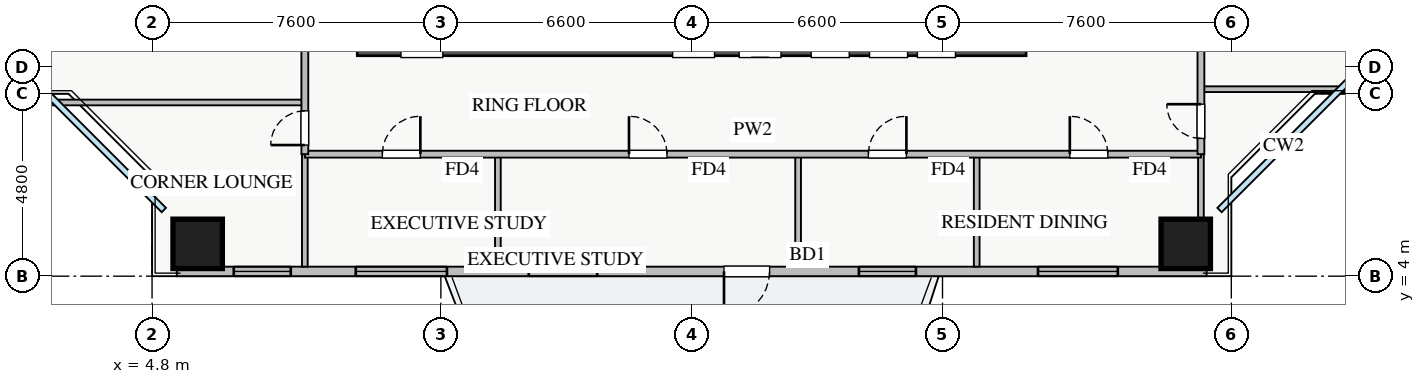
"""IFC4 building model, lengths in metres.
Left out: names, types, materials, properties, quantities, classifications, styles, units other than length and angle.
Written with IfcOpenShell. Run it as: python <this file> out.ifc"""

import sys

from ifc_helpers import new_model, si_unit, direction, frame, frame_2d, origin, origin_2d, place, context, subcontext, project, spatial, rectangle, extrude, source, transform, mapped, element, fill, save


model = new_model("IFC4")
c1 = context("Model", 3, precision=1e-05, world=origin(), true_north=direction((0.0, 1.0)))
c2 = subcontext(c1, "Body", "Model", "MODEL_VIEW")
j1 = project(units=[si_unit("LENGTHUNIT", "METRE"), si_unit("PLANEANGLEUNIT", "RADIAN")], contexts=[c1])
p1 = place(None, origin())
s1 = spatial("IfcSite", under=j1, at=p1, CompositionType="ELEMENT")
p2 = place(p1, origin())
s2 = spatial("IfcBuilding", under=s1, at=p2, CompositionType="ELEMENT")
p3 = place(p2, frame((0.0, 0.0, 56.75)))
s3 = spatial("IfcBuildingStorey", under=s2, at=p3, CompositionType="ELEMENT", Elevation=56.75)
p4 = place(p3, frame((10.2, 10.2, 0.0), z_axis=(0.0, 0.0, 1.0), x_axis=(1.0, 0.0, 0.0)))
e1 = element("IfcWall", 1, at=p4, inside=s3, PredefinedType="SHEAR", context=c2, shape_type="SweptSolid", body=[
    extrude(rectangle(XDim=17.6, YDim=0.8, at=frame_2d((8.8, 0.0))), origin(), (0.0, 0.0, 1.0), 3.25),
])
p5 = place(p4, frame((1.15, 0.0, 0.0)))
e2 = element("IfcOpeningElement", 2, at=p5, cuts=e1, PredefinedType="OPENING", context=c2, shape_type="SweptSolid", body=[
    extrude(rectangle(XDim=1.1, YDim=2.05, at=frame_2d((0.55, 1.025))), frame((0.0, 0.41, 0.0), z_axis=(0.0, -1.0, 0.0), x_axis=(1.0, 0.0, 0.0)), (0.0, 0.0, 1.0), 0.82),
])
p6 = place(p4, frame((8.3, 0.0, 0.0)))
e3 = element("IfcOpeningElement", 3, at=p6, cuts=e1, PredefinedType="OPENING", context=c2, shape_type="SweptSolid", body=[
    extrude(rectangle(XDim=1.1, YDim=2.05, at=frame_2d((0.55, 1.025))), frame((0.0, 0.41, 0.0), z_axis=(0.0, -1.0, 0.0), x_axis=(1.0, 0.0, 0.0)), (0.0, 0.0, 1.0), 0.82),
])
p7 = place(p4, frame((10.05, 0.0, 0.0)))
e4 = element("IfcOpeningElement", 4, at=p7, cuts=e1, PredefinedType="OPENING", context=c2, shape_type="SweptSolid", body=[
    extrude(rectangle(XDim=1.1, YDim=2.05, at=frame_2d((0.55, 1.025))), frame((0.0, 0.41, 0.0), z_axis=(0.0, -1.0, 0.0), x_axis=(1.0, 0.0, 0.0)), (0.0, 0.0, 1.0), 0.82),
])
p8 = place(p4, frame((14.74, 0.0, 0.0)))
e5 = element("IfcOpeningElement", 5, at=p8, cuts=e1, PredefinedType="OPENING", context=c2, shape_type="SweptSolid", body=[
    extrude(rectangle(XDim=1.0, YDim=2.05, at=frame_2d((0.5, 1.025))), frame((0.0, 0.41, 0.0), z_axis=(0.0, -1.0, 0.0), x_axis=(1.0, 0.0, 0.0)), (0.0, 0.0, 1.0), 0.82),
])
p9 = place(p4, frame((11.945, 0.0, 0.0)))
e6 = element("IfcOpeningElement", 6, at=p9, cuts=e1, PredefinedType="OPENING", context=c2, shape_type="SweptSolid", body=[
    extrude(rectangle(XDim=1.0, YDim=2.05, at=frame_2d((0.5, 1.025))), frame((0.0, 0.41, 0.0), z_axis=(0.0, -1.0, 0.0), x_axis=(1.0, 0.0, 0.0)), (0.0, 0.0, 1.0), 0.82),
])
p10 = place(p4, frame((13.48, 0.0, 0.0)))
e7 = element("IfcOpeningElement", 7, at=p10, cuts=e1, PredefinedType="OPENING", context=c2, shape_type="SweptSolid", body=[
    extrude(rectangle(XDim=1.0, YDim=2.05, at=frame_2d((0.5, 1.025))), frame((0.0, 0.41, 0.0), z_axis=(0.0, -1.0, 0.0), x_axis=(1.0, 0.0, 0.0)), (0.0, 0.0, 1.0), 0.82),
])
m1 = source(origin(), c2, "Body", "SweptSolid", [
    extrude(rectangle(XDim=1.3, YDim=1.3, at=origin_2d()), origin(), (0.0, 0.0, 1.0), 3.25),
])
for number, where, z_axis, x_axis in (
    (8, (6.0, 4.85, 0.0), (0.0, 0.0, 1.0), (1.0, 0.0, 0.0)),
    (9, (32.0, 4.85, 0.0), (0.0, 0.0, 1.0), (1.0, 0.0, 0.0)),
):
    element("IfcColumn", number, at=place(p3, frame(where, z_axis=z_axis, x_axis=x_axis)), inside=s3, PredefinedType="COLUMN", context=c2, shape_type="MappedRepresentation", body=[
        mapped(m1, transform((0.0, 0.0, 0.0), x_axis=(1.0, 0.0, 0.0), y_axis=(0.0, 1.0, 0.0), z_axis=(0.0, 0.0, 1.0), scale=1.0)),
    ])
p11 = place(p3, frame((5.45, 4.125, 0.0), z_axis=(0.0, 0.0, 1.0), x_axis=(1.0, 0.0, 0.0)))
e10 = element("IfcWall", 10, at=p11, inside=s3, PredefinedType="STANDARD", context=c2, shape_type="SweptSolid", body=[
    extrude(rectangle(XDim=27.1, YDim=0.25, at=frame_2d((13.55, 0.0))), origin(), (0.0, 0.0, 1.0), 2.61),
])
p12 = place(p11, frame((14.4, 0.0, 0.0)))
e11 = element("IfcOpeningElement", 11, at=p12, cuts=e10, PredefinedType="OPENING", context=c2, shape_type="SweptSolid", body=[
    extrude(rectangle(XDim=1.2, YDim=2.1, at=frame_2d((0.6, 1.05))), frame((0.0, 0.135, 0.0), z_axis=(0.0, -1.0, 0.0), x_axis=(1.0, 0.0, 0.0)), (0.0, 0.0, 1.0), 0.27),
])
p13 = place(p11, frame((1.5, 0.0, 0.9)))
e12 = element("IfcOpeningElement", 12, at=p13, cuts=e10, PredefinedType="OPENING", context=c2, shape_type="SweptSolid", body=[
    extrude(rectangle(XDim=1.5, YDim=1.5, at=frame_2d((0.75, 0.75))), frame((0.0, 0.135, 0.0), z_axis=(0.0, -1.0, 0.0), x_axis=(1.0, 0.0, 0.0)), (0.0, 0.0, 1.0), 0.27),
])
p14 = place(p11, frame((9.263, 0.0, 0.9)))
e13 = element("IfcOpeningElement", 13, at=p14, cuts=e10, PredefinedType="OPENING", context=c2, shape_type="SweptSolid", body=[
    extrude(rectangle(XDim=1.8, YDim=1.45, at=frame_2d((0.9, 0.725))), frame((0.0, 0.135, 0.0), z_axis=(0.0, -1.0, 0.0), x_axis=(1.0, 0.0, 0.0)), (0.0, 0.0, 1.0), 0.27),
])
p15 = place(p11, frame((17.95, 0.0, 0.9)))
e14 = element("IfcOpeningElement", 14, at=p15, cuts=e10, PredefinedType="OPENING", context=c2, shape_type="SweptSolid", body=[
    extrude(rectangle(XDim=1.5, YDim=1.5, at=frame_2d((0.75, 0.75))), frame((0.0, 0.135, 0.0), z_axis=(0.0, -1.0, 0.0), x_axis=(1.0, 0.0, 0.0)), (0.0, 0.0, 1.0), 0.27),
])
p16 = place(p11, frame((22.663, 0.0, 0.9)))
e15 = element("IfcOpeningElement", 15, at=p16, cuts=e10, PredefinedType="OPENING", context=c2, shape_type="SweptSolid", body=[
    extrude(rectangle(XDim=2.1, YDim=1.48, at=frame_2d((1.05, 0.74))), frame((0.0, 0.135, 0.0), z_axis=(0.0, -1.0, 0.0), x_axis=(1.0, 0.0, 0.0)), (0.0, 0.0, 1.0), 0.27),
])
p17 = place(p11, frame((4.71, 0.0, 0.9)))
e16 = element("IfcOpeningElement", 16, at=p17, cuts=e10, PredefinedType="OPENING", context=c2, shape_type="SweptSolid", body=[
    extrude(rectangle(XDim=2.4, YDim=1.5, at=frame_2d((1.2, 0.75))), frame((0.0, 0.135, 0.0), z_axis=(0.0, -1.0, 0.0), x_axis=(1.0, 0.0, 0.0)), (0.0, 0.0, 1.0), 0.27),
])
for number, where, z_axis, x_axis in (
    (17, (13.9, 4.25, 0.0), (0.0, 0.0, 1.0), (0.0, 1.0, 0.0)),
    (18, (21.8, 4.25, 0.0), (0.0, 0.0, 1.0), (0.0, 1.0, 0.0)),
    (19, (26.5, 4.25, 0.0), (0.0, 0.0, 1.0), (0.0, 1.0, 0.0)),
    (20, (8.82, 4.25, 0.0), (0.0, 0.0, 1.0), (0.0, 1.0, 0.0)),
    (21, (32.4, 4.25, 0.0), (0.0, 0.0, 1.0), (0.0, 1.0, 0.0)),
):
    element("IfcWall", number, at=place(p3, frame(where, z_axis=z_axis, x_axis=x_axis)), inside=s3, PredefinedType="PARTITIONING", context=c2, shape_type="SweptSolid", body=[
        extrude(rectangle(XDim=2.96, YDim=0.15, at=frame_2d((1.48, 0.0))), origin(), (0.0, 0.0, 1.0), 3.07),
    ])
p18 = place(p3, frame((8.82, 7.21, 0.0), z_axis=(0.0, 0.0, 1.0), x_axis=(1.0, 0.0, 0.0)))
e22 = element("IfcWall", 22, at=p18, inside=s3, PredefinedType="PARTITIONING", context=c2, shape_type="SweptSolid", body=[
    extrude(rectangle(XDim=23.58, YDim=0.18, at=frame_2d((11.79, 0.0))), origin(), (0.0, 0.0, 1.0), 3.07),
])
p19 = place(p18, frame((2.04, 0.0, 0.0)))
e23 = element("IfcOpeningElement", 23, at=p19, cuts=e22, PredefinedType="OPENING", context=c2, shape_type="SweptSolid", body=[
    extrude(rectangle(XDim=1.0, YDim=2.05, at=frame_2d((0.5, 1.025))), frame((0.0, 0.1, 0.0), z_axis=(0.0, -1.0, 0.0), x_axis=(1.0, 0.0, 0.0)), (0.0, 0.0, 1.0), 0.2),
])
p20 = place(p18, frame((8.53, 0.0, 0.0)))
e24 = element("IfcOpeningElement", 24, at=p20, cuts=e22, PredefinedType="OPENING", context=c2, shape_type="SweptSolid", body=[
    extrude(rectangle(XDim=1.0, YDim=2.05, at=frame_2d((0.5, 1.025))), frame((0.0, 0.1, 0.0), z_axis=(0.0, -1.0, 0.0), x_axis=(1.0, 0.0, 0.0)), (0.0, 0.0, 1.0), 0.2),
])
p21 = place(p18, frame((14.83, 0.0, 0.0)))
e25 = element("IfcOpeningElement", 25, at=p21, cuts=e22, PredefinedType="OPENING", context=c2, shape_type="SweptSolid", body=[
    extrude(rectangle(XDim=1.0, YDim=2.05, at=frame_2d((0.5, 1.025))), frame((0.0, 0.1, 0.0), z_axis=(0.0, -1.0, 0.0), x_axis=(1.0, 0.0, 0.0)), (0.0, 0.0, 1.0), 0.2),
])
p22 = place(p18, frame((20.13, 0.0, 0.0)))
e26 = element("IfcOpeningElement", 26, at=p22, cuts=e22, PredefinedType="OPENING", context=c2, shape_type="SweptSolid", body=[
    extrude(rectangle(XDim=1.0, YDim=2.05, at=frame_2d((0.5, 1.025))), frame((0.0, 0.1, 0.0), z_axis=(0.0, -1.0, 0.0), x_axis=(1.0, 0.0, 0.0)), (0.0, 0.0, 1.0), 0.2),
])
p23 = place(p3, frame((0.25, 8.57, 0.0), z_axis=(0.0, 0.0, 1.0), x_axis=(1.0, 0.0, 0.0)))
e27 = element("IfcWall", 27, at=p23, inside=s3, PredefinedType="PARTITIONING", context=c2, shape_type="SweptSolid", body=[
    extrude(rectangle(XDim=8.57, YDim=0.15, at=frame_2d((4.285, 0.0))), origin(), (0.0, 0.0, 1.0), 3.07),
])
p24 = place(p3, frame((8.82, 7.21, 0.0), z_axis=(0.0, 0.0, 1.0), x_axis=(0.0, 1.0, 0.0)))
e28 = element("IfcWall", 28, at=p24, inside=s3, PredefinedType="PARTITIONING", context=c2, shape_type="SweptSolid", body=[
    extrude(rectangle(XDim=31.23, YDim=0.18, at=frame_2d((15.615, 0.0))), origin(), (0.0, 0.0, 1.0), 3.07),
])
p25 = place(p24, frame((30.09, 0.0, 0.0)))
e29 = element("IfcOpeningElement", 29, at=p25, cuts=e28, PredefinedType="OPENING", context=c2, shape_type="SweptSolid", body=[
    extrude(rectangle(XDim=0.9, YDim=2.05, at=frame_2d((0.45, 1.025))), frame((0.0, 0.1, 0.0), z_axis=(0.0, -1.0, 0.0), x_axis=(1.0, 0.0, 0.0)), (0.0, 0.0, 1.0), 0.2),
])
p26 = place(p24, frame((0.24, 0.0, 0.0)))
e30 = element("IfcOpeningElement", 30, at=p26, cuts=e28, PredefinedType="OPENING", context=c2, shape_type="SweptSolid", body=[
    extrude(rectangle(XDim=0.9, YDim=2.05, at=frame_2d((0.45, 1.025))), frame((0.0, 0.1, 0.0), z_axis=(0.0, -1.0, 0.0), x_axis=(1.0, 0.0, 0.0)), (0.0, 0.0, 1.0), 0.2),
])
p27 = place(p24, frame((2.95, 0.0, 0.0)))
e31 = element("IfcOpeningElement", 31, at=p27, cuts=e28, PredefinedType="OPENING", context=c2, shape_type="SweptSolid", body=[
    extrude(rectangle(XDim=1.0, YDim=2.05, at=frame_2d((0.5, 1.025))), frame((0.0, 0.1, 0.0), z_axis=(0.0, -1.0, 0.0), x_axis=(1.0, 0.0, 0.0)), (0.0, 0.0, 1.0), 0.2),
])
p28 = place(p24, frame((15.115, 0.0, 0.0)))
e32 = element("IfcOpeningElement", 32, at=p28, cuts=e28, PredefinedType="OPENING", context=c2, shape_type="SweptSolid", body=[
    extrude(rectangle(XDim=1.0, YDim=2.05, at=frame_2d((0.5, 1.025))), frame((0.0, 0.1, 0.0), z_axis=(0.0, -1.0, 0.0), x_axis=(1.0, 0.0, 0.0)), (0.0, 0.0, 1.0), 0.2),
])
p29 = place(p24, frame((21.96, 0.0, 0.0)))
e33 = element("IfcOpeningElement", 33, at=p29, cuts=e28, PredefinedType="OPENING", context=c2, shape_type="SweptSolid", body=[
    extrude(rectangle(XDim=1.0, YDim=2.05, at=frame_2d((0.5, 1.025))), frame((0.0, 0.1, 0.0), z_axis=(0.0, -1.0, 0.0), x_axis=(1.0, 0.0, 0.0)), (0.0, 0.0, 1.0), 0.2),
])
p30 = place(p3, frame((32.4, 8.92, 0.0), z_axis=(0.0, 0.0, 1.0), x_axis=(1.0, 0.0, 0.0)))
e34 = element("IfcWall", 34, at=p30, inside=s3, PredefinedType="PARTITIONING", context=c2, shape_type="SweptSolid", body=[
    extrude(rectangle(XDim=5.35, YDim=0.15, at=frame_2d((2.675, 0.0))), origin(), (0.0, 0.0, 1.0), 3.07),
])
p31 = place(p3, frame((32.4, 7.21, 0.0), z_axis=(0.0, 0.0, 1.0), x_axis=(0.0, 1.0, 0.0)))
e35 = element("IfcWall", 35, at=p31, inside=s3, PredefinedType="PARTITIONING", context=c2, shape_type="SweptSolid", body=[
    extrude(rectangle(XDim=31.23, YDim=0.18, at=frame_2d((15.615, 0.0))), origin(), (0.0, 0.0, 1.0), 2.815),
])
p32 = place(p31, frame((30.09, 0.0, 0.0)))
e36 = element("IfcOpeningElement", 36, at=p32, cuts=e35, PredefinedType="OPENING", context=c2, shape_type="SweptSolid", body=[
    extrude(rectangle(XDim=0.9, YDim=2.05, at=frame_2d((0.45, 1.025))), frame((0.0, 0.1, 0.0), z_axis=(0.0, -1.0, 0.0), x_axis=(1.0, 0.0, 0.0)), (0.0, 0.0, 1.0), 0.2),
])
p33 = place(p31, frame((0.415, 0.0, 0.0)))
e37 = element("IfcOpeningElement", 37, at=p33, cuts=e35, PredefinedType="OPENING", context=c2, shape_type="SweptSolid", body=[
    extrude(rectangle(XDim=0.9, YDim=2.05, at=frame_2d((0.45, 1.025))), frame((0.0, 0.1, 0.0), z_axis=(0.0, -1.0, 0.0), x_axis=(1.0, 0.0, 0.0)), (0.0, 0.0, 1.0), 0.2),
])
p34 = place(p31, frame((3.585, 0.0, 0.0)))
e38 = element("IfcOpeningElement", 38, at=p34, cuts=e35, PredefinedType="OPENING", context=c2, shape_type="SweptSolid", body=[
    extrude(rectangle(XDim=1.0, YDim=2.05, at=frame_2d((0.5, 1.025))), frame((0.0, 0.1, 0.0), z_axis=(0.0, -1.0, 0.0), x_axis=(1.0, 0.0, 0.0)), (0.0, 0.0, 1.0), 0.2),
])
p35 = place(p31, frame((12.86, 0.0, 0.0)))
e39 = element("IfcOpeningElement", 39, at=p35, cuts=e35, PredefinedType="OPENING", context=c2, shape_type="SweptSolid", body=[
    extrude(rectangle(XDim=1.0, YDim=2.05, at=frame_2d((0.5, 1.025))), frame((0.0, 0.1, 0.0), z_axis=(0.0, -1.0, 0.0), x_axis=(1.0, 0.0, 0.0)), (0.0, 0.0, 1.0), 0.2),
])
p36 = place(p31, frame((22.5, 0.0, 0.0)))
e40 = element("IfcOpeningElement", 40, at=p36, cuts=e35, PredefinedType="OPENING", context=c2, shape_type="SweptSolid", body=[
    extrude(rectangle(XDim=1.0, YDim=2.05, at=frame_2d((0.5, 1.025))), frame((0.0, 0.1, 0.0), z_axis=(0.0, -1.0, 0.0), x_axis=(1.0, 0.0, 0.0)), (0.0, 0.0, 1.0), 0.2),
])
m2 = source(origin(), c2, "Body", "SweptSolid", [
    extrude(rectangle(XDim=1.2, YDim=2.1, at=frame_2d((0.6, 1.05))), frame((0.0, 0.025, 0.0), z_axis=(0.0, -1.0, 0.0), x_axis=(1.0, 0.0, 0.0)), (0.0, 0.0, 1.0), 0.05),
])
p37 = place(p12, frame((1.2, 0.0, 0.0), z_axis=(0.0, 0.0, 1.0), x_axis=(-1.0, 0.0, 0.0)))
e41 = element("IfcDoor", 41, at=p37, inside=s3, OperationType="SINGLE_SWING_LEFT", PredefinedType="DOOR", context=c2, shape_type="MappedRepresentation", body=[
    mapped(m2, transform((0.0, 0.0, 0.0), x_axis=(1.0, 0.0, 0.0), y_axis=(0.0, 1.0, 0.0), z_axis=(0.0, 0.0, 1.0), scale=1.0)),
])
fill(e11, e41)
m3 = source(origin(), c2, "Body", "SweptSolid", [
    extrude(rectangle(XDim=1.5, YDim=1.5, at=frame_2d((0.75, 0.75))), frame((0.0, 0.03, 0.0), z_axis=(0.0, -1.0, 0.0), x_axis=(1.0, 0.0, 0.0)), (0.0, 0.0, 1.0), 0.06),
])
p38 = place(p13, origin())
e42 = element("IfcWindow", 42, at=p38, inside=s3, PartitioningType="TRIPLE_PANEL_VERTICAL", PredefinedType="WINDOW", context=c2, shape_type="MappedRepresentation", body=[
    mapped(m3, transform((0.0, 0.0, 0.0), x_axis=(1.0, 0.0, 0.0), y_axis=(0.0, 1.0, 0.0), z_axis=(0.0, 0.0, 1.0), scale=1.0)),
])
fill(e12, e42)
m4 = source(origin(), c2, "Body", "SweptSolid", [
    extrude(rectangle(XDim=1.8, YDim=1.45, at=frame_2d((0.9, 0.725))), frame((0.0, 0.03, 0.0), z_axis=(0.0, -1.0, 0.0), x_axis=(1.0, 0.0, 0.0)), (0.0, 0.0, 1.0), 0.06),
])
p39 = place(p14, origin())
e43 = element("IfcWindow", 43, at=p39, inside=s3, PartitioningType="DOUBLE_PANEL_VERTICAL", PredefinedType="WINDOW", context=c2, shape_type="MappedRepresentation", body=[
    mapped(m4, transform((0.0, 0.0, 0.0), x_axis=(1.0, 0.0, 0.0), y_axis=(0.0, 1.0, 0.0), z_axis=(0.0, 0.0, 1.0), scale=1.0)),
])
fill(e13, e43)
p40 = place(p15, origin())
e44 = element("IfcWindow", 44, at=p40, inside=s3, PartitioningType="DOUBLE_PANEL_VERTICAL", PredefinedType="WINDOW", context=c2, shape_type="MappedRepresentation", body=[
    mapped(m3, transform((0.0, 0.0, 0.0), x_axis=(1.0, 0.0, 0.0), y_axis=(0.0, 1.0, 0.0), z_axis=(0.0, 0.0, 1.0), scale=1.0)),
])
fill(e14, e44)
m5 = source(origin(), c2, "Body", "SweptSolid", [
    extrude(rectangle(XDim=2.1, YDim=1.48, at=frame_2d((1.05, 0.74))), frame((0.0, 0.03, 0.0), z_axis=(0.0, -1.0, 0.0), x_axis=(1.0, 0.0, 0.0)), (0.0, 0.0, 1.0), 0.06),
])
p41 = place(p16, origin())
e45 = element("IfcWindow", 45, at=p41, inside=s3, PartitioningType="TRIPLE_PANEL_VERTICAL", PredefinedType="WINDOW", context=c2, shape_type="MappedRepresentation", body=[
    mapped(m5, transform((0.0, 0.0, 0.0), x_axis=(1.0, 0.0, 0.0), y_axis=(0.0, 1.0, 0.0), z_axis=(0.0, 0.0, 1.0), scale=1.0)),
])
fill(e15, e45)
m6 = source(origin(), c2, "Body", "SweptSolid", [
    extrude(rectangle(XDim=1.0, YDim=2.05, at=frame_2d((0.5, 1.025))), frame((0.0, 0.025, 0.0), z_axis=(0.0, -1.0, 0.0), x_axis=(1.0, 0.0, 0.0)), (0.0, 0.0, 1.0), 0.05),
])
p42 = place(p19, origin())
e46 = element("IfcDoor", 46, at=p42, inside=s3, OperationType="SINGLE_SWING_RIGHT", PredefinedType="DOOR", context=c2, shape_type="MappedRepresentation", body=[
    mapped(m6, transform((0.0, 0.0, 0.0), x_axis=(1.0, 0.0, 0.0), y_axis=(0.0, 1.0, 0.0), z_axis=(0.0, 0.0, 1.0), scale=1.0)),
])
fill(e23, e46)
p43 = place(p20, origin())
e47 = element("IfcDoor", 47, at=p43, inside=s3, OperationType="SINGLE_SWING_LEFT", PredefinedType="DOOR", context=c2, shape_type="MappedRepresentation", body=[
    mapped(m6, transform((0.0, 0.0, 0.0), x_axis=(1.0, 0.0, 0.0), y_axis=(0.0, 1.0, 0.0), z_axis=(0.0, 0.0, 1.0), scale=1.0)),
])
fill(e24, e47)
p44 = place(p21, origin())
e48 = element("IfcDoor", 48, at=p44, inside=s3, OperationType="SINGLE_SWING_RIGHT", PredefinedType="DOOR", context=c2, shape_type="MappedRepresentation", body=[
    mapped(m6, transform((0.0, 0.0, 0.0), x_axis=(1.0, 0.0, 0.0), y_axis=(0.0, 1.0, 0.0), z_axis=(0.0, 0.0, 1.0), scale=1.0)),
])
fill(e25, e48)
p45 = place(p22, origin())
e49 = element("IfcDoor", 49, at=p45, inside=s3, OperationType="SINGLE_SWING_LEFT", PredefinedType="DOOR", context=c2, shape_type="MappedRepresentation", body=[
    mapped(m6, transform((0.0, 0.0, 0.0), x_axis=(1.0, 0.0, 0.0), y_axis=(0.0, 1.0, 0.0), z_axis=(0.0, 0.0, 1.0), scale=1.0)),
])
fill(e26, e49)
m7 = source(origin(), c2, "Body", "SweptSolid", [
    extrude(rectangle(XDim=0.9, YDim=2.05, at=frame_2d((0.45, 1.025))), frame((0.0, 0.025, 0.0), z_axis=(0.0, -1.0, 0.0), x_axis=(1.0, 0.0, 0.0)), (0.0, 0.0, 1.0), 0.05),
])
p46 = place(p26, origin())
e50 = element("IfcDoor", 50, at=p46, inside=s3, OperationType="SINGLE_SWING_LEFT", PredefinedType="DOOR", context=c2, shape_type="MappedRepresentation", body=[
    mapped(m7, transform((0.0, 0.0, 0.0), x_axis=(1.0, 0.0, 0.0), y_axis=(0.0, 1.0, 0.0), z_axis=(0.0, 0.0, 1.0), scale=1.0)),
])
fill(e30, e50)
p47 = place(p33, origin())
e51 = element("IfcDoor", 51, at=p47, inside=s3, OperationType="SINGLE_SWING_RIGHT", PredefinedType="DOOR", context=c2, shape_type="MappedRepresentation", body=[
    mapped(m7, transform((0.0, 0.0, 0.0), x_axis=(1.0, 0.0, 0.0), y_axis=(0.0, 1.0, 0.0), z_axis=(0.0, 0.0, 1.0), scale=1.0)),
])
fill(e37, e51)
m8 = source(origin(), c2, "Body", "SweptSolid", [
    extrude(rectangle(XDim=2.4, YDim=1.5, at=frame_2d((1.2, 0.75))), frame((0.0, 0.03, 0.0), z_axis=(0.0, -1.0, 0.0), x_axis=(1.0, 0.0, 0.0)), (0.0, 0.0, 1.0), 0.06),
])
p48 = place(p17, origin())
e52 = element("IfcWindow", 52, at=p48, inside=s3, PartitioningType="TRIPLE_PANEL_VERTICAL", PredefinedType="WINDOW", context=c2, shape_type="MappedRepresentation", body=[
    mapped(m8, transform((0.0, 0.0, 0.0), x_axis=(1.0, 0.0, 0.0), y_axis=(0.0, 1.0, 0.0), z_axis=(0.0, 0.0, 1.0), scale=1.0)),
])
fill(e16, e52)
save(model, sys.argv[1])
